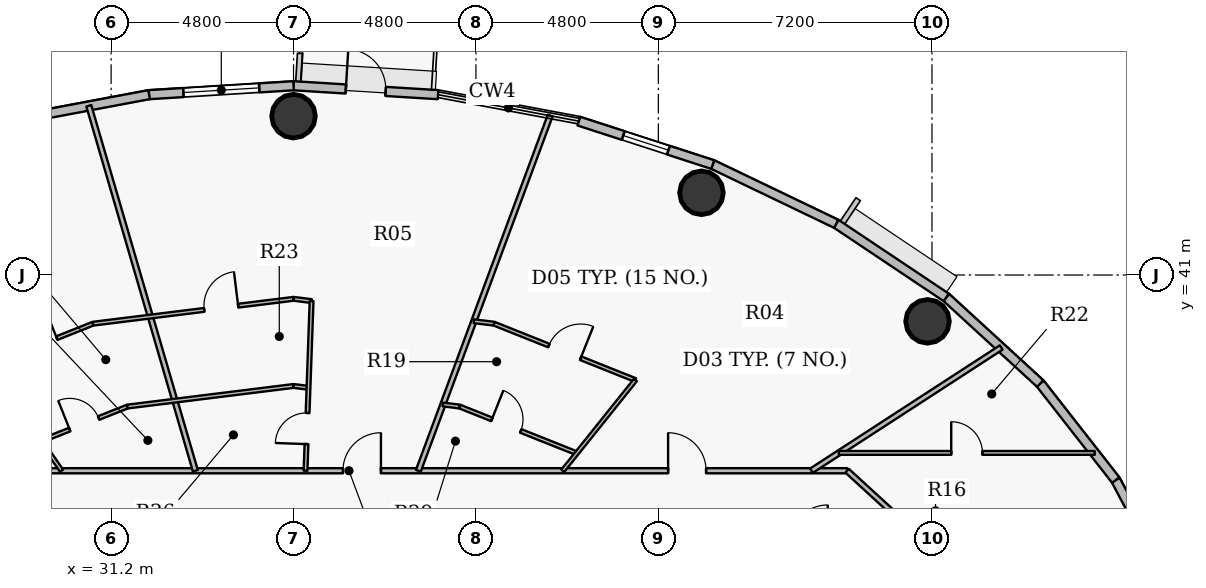
"""IFC4 building model, lengths in metres.
Left out: names, types, materials, properties, quantities, classifications, styles, units other than length and angle.
Written with IfcOpenShell. Run it as: python <this file> out.ifc"""

import sys

from ifc_helpers import new_model, si_unit, direction, frame, frame_2d, origin, origin_2d, place, context, subcontext, project, spatial, rectangle, hollow_circle, extrude, source, transform, mapped, element, fill, save


model = new_model("IFC4")
c1 = context("Model", 3, precision=1e-05, world=origin(), true_north=direction((0.0, 1.0)))
c2 = subcontext(c1, "Body", "Model", "MODEL_VIEW")
j1 = project(units=[si_unit("LENGTHUNIT", "METRE"), si_unit("PLANEANGLEUNIT", "RADIAN")], contexts=[c1])
p1 = place(None, origin())
s1 = spatial("IfcSite", under=j1, at=p1, CompositionType="ELEMENT")
p2 = place(p1, origin())
s2 = spatial("IfcBuilding", under=s1, at=p2, CompositionType="ELEMENT")
p3 = place(p2, frame((0.0, 0.0, 221.55)))
s3 = spatial("IfcBuildingStorey", under=s2, at=p3, CompositionType="ELEMENT", Elevation=221.55)
for number, where, z_axis, x_axis in (
    (1, (52.683, 39.781, 0.0), (0.0, 0.0, 1.0), (1.0, 0.0, 0.0)),
    (2, (46.735, 43.164, 0.0), (0.0, 0.0, 1.0), (1.0, 0.0, 0.0)),
    (3, (36.0, 45.18, 0.0), (0.0, 0.0, 1.0), (1.0, 0.0, 0.0)),
):
    element("IfcColumn", number, at=place(p3, frame(where, z_axis=z_axis, x_axis=x_axis)), inside=s3, PredefinedType="COLUMN", context=c2, shape_type="SweptSolid", body=[
        extrude(hollow_circle(Radius=0.575, WallThickness=0.036, at=origin_2d()), origin(), (0.0, 0.0, 1.0), 3.75),
    ])
p4 = place(p3, frame((57.636, 35.605, 0.0), z_axis=(0.0, 0.0, 1.0), x_axis=(0.46766049993, -0.883908172157, 0.0)))
e4 = element("IfcWall", 4, at=p4, inside=s3, PredefinedType="SOLIDWALL", context=c2, shape_type="SweptSolid", body=[
    extrude(rectangle(XDim=3.11, YDim=0.24, at=frame_2d((1.555, 0.0))), origin(), (0.0, 0.0, 1.0), 3.5),
])
p5 = place(p3, frame((55.648, 38.145, 0.0), z_axis=(0.0, 0.0, 1.0), x_axis=(0.616312344705, -0.787501805562, 0.0)))
e5 = element("IfcWall", 5, at=p5, inside=s3, PredefinedType="SOLIDWALL", context=c2, shape_type="SweptSolid", body=[
    extrude(rectangle(XDim=3.225, YDim=0.24, at=frame_2d((1.612, 0.0))), origin(), (0.0, 0.0, 1.0), 3.5),
])
p6 = place(p3, frame((53.176, 40.411, 0.0), z_axis=(0.0, 0.0, 1.0), x_axis=(0.737123922599, -0.675757591694, 0.0)))
e6 = element("IfcWall", 6, at=p6, inside=s3, PredefinedType="SOLIDWALL", context=c2, shape_type="SweptSolid", body=[
    extrude(rectangle(XDim=3.354, YDim=0.24, at=frame_2d((1.677, 0.0))), origin(), (0.0, 0.0, 1.0), 3.5),
])
p7 = place(p3, frame((50.28, 42.348, 0.0), z_axis=(0.0, 0.0, 1.0), x_axis=(0.831262496074, -0.555880079352, 0.0)))
e7 = element("IfcWall", 7, at=p7, inside=s3, PredefinedType="SOLIDWALL", context=c2, shape_type="SweptSolid", body=[
    extrude(rectangle(XDim=3.484, YDim=0.24, at=frame_2d((1.742, 0.0))), origin(), (0.0, 0.0, 1.0), 3.5),
])
p8 = place(p3, frame((47.031, 43.906, 0.0), z_axis=(0.0, 0.0, 1.0), x_axis=(0.901598104751, -0.432574684313, 0.0)))
e8 = element("IfcWall", 8, at=p8, inside=s3, PredefinedType="SOLIDWALL", context=c2, shape_type="SweptSolid", body=[
    extrude(rectangle(XDim=3.604, YDim=0.24, at=frame_2d((1.802, 0.0))), origin(), (0.0, 0.0, 1.0), 3.5),
])
p9 = place(p3, frame((43.509, 45.049, 0.0), z_axis=(0.0, 0.0, 1.0), x_axis=(0.951210789182, -0.308541787354, 0.0)))
e9 = element("IfcWall", 9, at=p9, inside=s3, PredefinedType="SOLIDWALL", context=c2, shape_type="SweptSolid", body=[
    extrude(rectangle(XDim=3.702, YDim=0.24, at=frame_2d((1.851, 0.0))), origin(), (0.0, 0.0, 1.0), 3.5),
])
p10 = place(p9, frame((1.226, 0.0, 0.9)))
e10 = element("IfcOpeningElement", 10, at=p10, cuts=e9, PredefinedType="OPENING", context=c2, shape_type="SweptSolid", body=[
    extrude(rectangle(XDim=1.25, YDim=1.65, at=origin_2d()), frame((0.625, 0.13, 0.825), z_axis=(0.0, -1.0, 0.0), x_axis=(1.0, 0.0, 0.0)), (0.0, 0.0, 1.0), 0.26),
])
p11 = place(p3, frame((36.0, 45.98, 0.0), z_axis=(0.0, 0.0, 1.0), x_axis=(0.998108785312, -0.06147237333, 0.0)))
e11 = element("IfcWall", 11, at=p11, inside=s3, PredefinedType="SOLIDWALL", context=c2, shape_type="SweptSolid", body=[
    extrude(rectangle(XDim=3.809, YDim=0.24, at=frame_2d((1.904, 0.0))), origin(), (0.0, 0.0, 1.0), 3.5),
])
p12 = place(p11, frame((1.379, 0.0, 0.0)))
e12 = element("IfcOpeningElement", 12, at=p12, cuts=e11, PredefinedType="OPENING", context=c2, shape_type="SweptSolid", body=[
    extrude(rectangle(XDim=1.05, YDim=2.15, at=origin_2d()), frame((0.525, 0.13, 1.075), z_axis=(0.0, -1.0, 0.0), x_axis=(1.0, 0.0, 0.0)), (0.0, 0.0, 1.0), 0.26),
])
p13 = place(p3, frame((32.198, 45.746, 0.0), z_axis=(0.0, 0.0, 1.0), x_axis=(0.998108785312, 0.06147237333, 0.0)))
e13 = element("IfcWall", 13, at=p13, inside=s3, PredefinedType="SOLIDWALL", context=c2, shape_type="SweptSolid", body=[
    extrude(rectangle(XDim=3.809, YDim=0.24, at=frame_2d((1.904, 0.0))), origin(), (0.0, 0.0, 1.0), 3.5),
])
p14 = place(p13, frame((0.905, 0.0, 0.9)))
e14 = element("IfcOpeningElement", 14, at=p14, cuts=e13, PredefinedType="OPENING", context=c2, shape_type="SweptSolid", body=[
    extrude(rectangle(XDim=2.0, YDim=1.75, at=origin_2d()), frame((1.0, 0.13, 0.875), z_axis=(0.0, -1.0, 0.0), x_axis=(1.0, 0.0, 0.0)), (0.0, 0.0, 1.0), 0.26),
])
p15 = place(p3, frame((28.491, 45.049, 0.0), z_axis=(0.0, 0.0, 1.0), x_axis=(0.982784898575, 0.184753465822, 0.0)))
e15 = element("IfcWall", 15, at=p15, inside=s3, PredefinedType="SOLIDWALL", context=c2, shape_type="SweptSolid", body=[
    extrude(rectangle(XDim=3.773, YDim=0.24, at=frame_2d((1.886, 0.0))), origin(), (0.0, 0.0, 1.0), 3.5),
])
p16 = place(p3, frame((24.35, 35.85, 0.0), z_axis=(0.0, 0.0, 1.0), x_axis=(1.0, 0.0, 0.0)))
e16 = element("IfcWall", 16, at=p16, inside=s3, PredefinedType="PARTITIONING", context=c2, shape_type="SweptSolid", body=[
    extrude(rectangle(XDim=26.218, YDim=0.135, at=frame_2d((13.109, 0.0))), origin(), (0.0, 0.0, 1.0), 2.935),
])
p17 = place(p16, frame((21.507, 0.0, 0.0)))
e17 = element("IfcOpeningElement", 17, at=p17, cuts=e16, PredefinedType="OPENING", context=c2, shape_type="SweptSolid", body=[
    extrude(rectangle(XDim=1.0, YDim=2.15, at=origin_2d()), frame((0.5, 0.078, 1.075), z_axis=(0.0, -1.0, 0.0), x_axis=(1.0, 0.0, 0.0)), (0.0, 0.0, 1.0), 0.155),
])
p18 = place(p16, frame((12.95, 0.0, 0.0)))
e18 = element("IfcOpeningElement", 18, at=p18, cuts=e16, PredefinedType="OPENING", context=c2, shape_type="SweptSolid", body=[
    extrude(rectangle(XDim=1.0, YDim=2.15, at=origin_2d()), frame((0.5, 0.078, 1.075), z_axis=(0.0, -1.0, 0.0), x_axis=(1.0, 0.0, 0.0)), (0.0, 0.0, 1.0), 0.155),
])
p19 = place(p16, frame((2.293, 0.0, 0.0)))
e19 = element("IfcOpeningElement", 19, at=p19, cuts=e16, PredefinedType="OPENING", context=c2, shape_type="SweptSolid", body=[
    extrude(rectangle(XDim=1.0, YDim=2.15, at=origin_2d()), frame((0.5, 0.078, 1.075), z_axis=(0.0, -1.0, 0.0), x_axis=(1.0, 0.0, 0.0)), (0.0, 0.0, 1.0), 0.155),
])
p20 = place(p3, frame((27.982, 38.626, 0.0), z_axis=(0.0, 0.0, 1.0), x_axis=(0.56776340906, -0.823191782838, 0.0)))
e20 = element("IfcWall", 20, at=p20, inside=s3, PredefinedType="PARTITIONING", context=c2, shape_type="SweptSolid", body=[
    extrude(rectangle(XDim=3.372, YDim=0.1, at=frame_2d((1.686, 0.0))), origin(), (0.0, 0.0, 1.0), 3.5),
])
p21 = place(p3, frame((27.982, 38.626, 0.0), z_axis=(0.0, 0.0, 1.0), x_axis=(0.928795965169, 0.370591493542, 0.0)))
e21 = element("IfcWall", 21, at=p21, inside=s3, PredefinedType="PARTITIONING", context=c2, shape_type="SweptSolid", body=[
    extrude(rectangle(XDim=2.95, YDim=0.1, at=frame_2d((1.475, 0.0))), origin(), (0.0, 0.0, 1.0), 2.935),
])
p22 = place(p21, frame((1.025, 0.0, 0.0)))
e22 = element("IfcOpeningElement", 22, at=p22, cuts=e21, PredefinedType="OPENING", context=c2, shape_type="SweptSolid", body=[
    extrude(rectangle(XDim=0.9, YDim=2.1, at=origin_2d()), frame((0.45, 0.06, 1.05), z_axis=(0.0, -1.0, 0.0), x_axis=(1.0, 0.0, 0.0)), (0.0, 0.0, 1.0), 0.12),
])
p23 = place(p3, frame((29.356, 36.633, 0.0), z_axis=(0.0, 0.0, 1.0), x_axis=(0.928806968298, 0.370563915731, 0.0)))
e23 = element("IfcWall", 23, at=p23, inside=s3, PredefinedType="PARTITIONING", context=c2, shape_type="SweptSolid", body=[
    extrude(rectangle(XDim=2.444, YDim=0.1, at=frame_2d((1.222, 0.0))), origin(), (0.0, 0.0, 1.0), 2.935),
])
p24 = place(p23, frame((0.812, 0.0, 0.0)))
e24 = element("IfcOpeningElement", 24, at=p24, cuts=e23, PredefinedType="OPENING", context=c2, shape_type="SweptSolid", body=[
    extrude(rectangle(XDim=0.82, YDim=2.1, at=origin_2d()), frame((0.41, 0.06, 1.05), z_axis=(0.0, -1.0, 0.0), x_axis=(1.0, 0.0, 0.0)), (0.0, 0.0, 1.0), 0.12),
])
p25 = place(p3, frame((30.613, 45.453, 0.0), z_axis=(0.0, 0.0, 1.0), x_axis=(0.280222100614, -0.959935192775, 0.0)))
e25 = element("IfcWall", 25, at=p25, inside=s3, PredefinedType="PARTITIONING", context=c2, shape_type="SweptSolid", body=[
    extrude(rectangle(XDim=10.004, YDim=0.135, at=frame_2d((5.002, 0.0))), origin(), (0.0, 0.0, 1.0), 2.985),
])
p26 = place(p3, frame((30.722, 39.719, 0.0), z_axis=(0.0, 0.0, 1.0), x_axis=(0.992398169186, 0.123068573551, 0.0)))
e26 = element("IfcWall", 26, at=p26, inside=s3, PredefinedType="PARTITIONING", context=c2, shape_type="SweptSolid", body=[
    extrude(rectangle(XDim=5.319, YDim=0.1, at=frame_2d((2.659, 0.0))), origin(), (0.0, 0.0, 1.0), 2.935),
])
p27 = place(p26, frame((2.95, 0.0, 0.0)))
e27 = element("IfcOpeningElement", 27, at=p27, cuts=e26, PredefinedType="OPENING", context=c2, shape_type="SweptSolid", body=[
    extrude(rectangle(XDim=0.9, YDim=2.1, at=origin_2d()), frame((0.45, 0.06, 1.05), z_axis=(0.0, -1.0, 0.0), x_axis=(1.0, 0.0, 0.0)), (0.0, 0.0, 1.0), 0.12),
])
p28 = place(p3, frame((31.627, 37.539, 0.0), z_axis=(0.0, 0.0, 1.0), x_axis=(0.992401810072, 0.123039210683, 0.0)))
e28 = element("IfcWall", 28, at=p28, inside=s3, PredefinedType="PARTITIONING", context=c2, shape_type="SweptSolid", body=[
    extrude(rectangle(XDim=4.407, YDim=0.1, at=frame_2d((2.204, 0.0))), origin(), (0.0, 0.0, 1.0), 2.935),
])
p29 = place(p3, frame((36.0, 38.081, 0.0), z_axis=(0.0, 0.0, 1.0), x_axis=(0.99240043869, -0.123050271381, 0.0)))
e29 = element("IfcWall", 29, at=p29, inside=s3, PredefinedType="PARTITIONING", context=c2, shape_type="SweptSolid", body=[
    extrude(rectangle(XDim=0.397, YDim=0.1, at=frame_2d((0.198, 0.0))), origin(), (0.0, 0.0, 1.0), 2.935),
])
p30 = place(p3, frame((36.0, 40.374, 0.0), z_axis=(0.0, 0.0, 1.0), x_axis=(0.992363891793, -0.123344664517, 0.0)))
e30 = element("IfcWall", 30, at=p30, inside=s3, PredefinedType="PARTITIONING", context=c2, shape_type="SweptSolid", body=[
    extrude(rectangle(XDim=0.479, YDim=0.1, at=frame_2d((0.24, 0.0))), origin(), (0.0, 0.0, 1.0), 2.935),
])
p31 = place(p3, frame((36.316, 35.85, 0.0), z_axis=(0.0, 0.0, 1.0), x_axis=(0.035687631784, 0.99936299358, 0.0)))
e31 = element("IfcWall", 31, at=p31, inside=s3, PredefinedType="PARTITIONING", context=c2, shape_type="SweptSolid", body=[
    extrude(rectangle(XDim=4.467, YDim=0.1, at=frame_2d((2.234, 0.0))), origin(), (0.0, 0.0, 1.0), 3.5),
])
p32 = place(p31, frame((0.702, 0.0, 0.0)))
e32 = element("IfcOpeningElement", 32, at=p32, cuts=e31, PredefinedType="OPENING", context=c2, shape_type="SweptSolid", body=[
    extrude(rectangle(XDim=0.82, YDim=2.1, at=origin_2d()), frame((0.41, 0.06, 1.05), z_axis=(0.0, -1.0, 0.0), x_axis=(1.0, 0.0, 0.0)), (0.0, 0.0, 1.0), 0.12),
])
p33 = place(p3, frame((39.285, 35.85, 0.0), z_axis=(0.0, 0.0, 1.0), x_axis=(0.347978689674, 0.937502443481, 0.0)))
e33 = element("IfcWall", 33, at=p33, inside=s3, PredefinedType="PARTITIONING", context=c2, shape_type="SweptSolid", body=[
    extrude(rectangle(XDim=9.969, YDim=0.135, at=frame_2d((4.984, 0.0))), origin(), (0.0, 0.0, 1.0), 2.985),
])
p34 = place(p3, frame((39.932, 37.593, 0.0), z_axis=(0.0, 0.0, 1.0), x_axis=(0.992412401992, -0.122953748919, 0.0)))
e34 = element("IfcWall", 34, at=p34, inside=s3, PredefinedType="PARTITIONING", context=c2, shape_type="SweptSolid", body=[
    extrude(rectangle(XDim=0.445, YDim=0.1, at=frame_2d((0.222, 0.0))), origin(), (0.0, 0.0, 1.0), 3.5),
])
p35 = place(p3, frame((40.373, 37.539, 0.0), z_axis=(0.0, 0.0, 1.0), x_axis=(0.928801257211, -0.370578230071, 0.0)))
e35 = element("IfcWall", 35, at=p35, inside=s3, PredefinedType="PARTITIONING", context=c2, shape_type="SweptSolid", body=[
    extrude(rectangle(XDim=3.316, YDim=0.1, at=frame_2d((1.658, 0.0))), origin(), (0.0, 0.0, 1.0), 2.935),
])
p36 = place(p35, frame((0.91, 0.0, 0.0)))
e36 = element("IfcOpeningElement", 36, at=p36, cuts=e35, PredefinedType="OPENING", context=c2, shape_type="SweptSolid", body=[
    extrude(rectangle(XDim=0.82, YDim=2.1, at=origin_2d()), frame((0.41, 0.06, 1.05), z_axis=(0.0, -1.0, 0.0), x_axis=(1.0, 0.0, 0.0)), (0.0, 0.0, 1.0), 0.12),
])
p37 = place(p3, frame((40.745, 39.785, 0.0), z_axis=(0.0, 0.0, 1.0), x_axis=(0.992431053699, -0.122803109303, 0.0)))
e37 = element("IfcWall", 37, at=p37, inside=s3, PredefinedType="PARTITIONING", context=c2, shape_type="SweptSolid", body=[
    extrude(rectangle(XDim=0.537, YDim=0.1, at=frame_2d((0.269, 0.0))), origin(), (0.0, 0.0, 1.0), 3.5),
])
p38 = place(p3, frame((41.278, 39.719, 0.0), z_axis=(0.0, 0.0, 1.0), x_axis=(0.928808650267, -0.3705596999, 0.0)))
e38 = element("IfcWall", 38, at=p38, inside=s3, PredefinedType="PARTITIONING", context=c2, shape_type="SweptSolid", body=[
    extrude(rectangle(XDim=4.002, YDim=0.1, at=frame_2d((2.001, 0.0))), origin(), (0.0, 0.0, 1.0), 2.935),
])
p39 = place(p38, frame((1.551, 0.0, 0.0)))
e39 = element("IfcOpeningElement", 39, at=p39, cuts=e38, PredefinedType="OPENING", context=c2, shape_type="SweptSolid", body=[
    extrude(rectangle(XDim=0.9, YDim=2.1, at=origin_2d()), frame((0.45, 0.06, 1.05), z_axis=(0.0, -1.0, 0.0), x_axis=(1.0, 0.0, 0.0)), (0.0, 0.0, 1.0), 0.12),
])
p40 = place(p3, frame((43.085, 35.85, 0.0), z_axis=(0.0, 0.0, 1.0), x_axis=(0.62500673738, 0.780619355531, 0.0)))
e40 = element("IfcWall", 40, at=p40, inside=s3, PredefinedType="PARTITIONING", context=c2, shape_type="SweptSolid", body=[
    extrude(rectangle(XDim=3.056, YDim=0.1, at=frame_2d((1.528, 0.0))), origin(), (0.0, 0.0, 1.0), 3.5),
])
p41 = place(p3, frame((49.628, 35.85, 0.0), z_axis=(0.0, 0.0, 1.0), x_axis=(0.838688976762, 0.544610686875, 0.0)))
e41 = element("IfcWall", 41, at=p41, inside=s3, PredefinedType="PARTITIONING", context=c2, shape_type="SweptSolid", body=[
    extrude(rectangle(XDim=5.954, YDim=0.135, at=frame_2d((2.977, 0.0))), origin(), (0.0, 0.0, 1.0), 2.985),
])
p42 = place(p3, frame((50.351, 36.319, 0.0), z_axis=(0.0, 0.0, 1.0), x_axis=(1.0, 0.0, 0.0)))
e42 = element("IfcWall", 42, at=p42, inside=s3, PredefinedType="PARTITIONING", context=c2, shape_type="SweptSolid", body=[
    extrude(rectangle(XDim=6.733, YDim=0.1, at=frame_2d((3.366, 0.0))), origin(), (0.0, 0.0, 1.0), 2.985),
])
p43 = place(p42, frame((2.956, 0.0, 0.0)))
e43 = element("IfcOpeningElement", 43, at=p43, cuts=e42, PredefinedType="OPENING", context=c2, shape_type="SweptSolid", body=[
    extrude(rectangle(XDim=0.82, YDim=2.1, at=origin_2d()), frame((0.41, 0.06, 1.05), z_axis=(0.0, -1.0, 0.0), x_axis=(1.0, 0.0, 0.0)), (0.0, 0.0, 1.0), 0.12),
])
p44 = place(p3, frame((50.568, 35.85, 0.0), z_axis=(0.0, 0.0, 1.0), x_axis=(0.737102657331, -0.675780787353, 0.0)))
e44 = element("IfcWall", 44, at=p44, inside=s3, PredefinedType="PARTITIONING", context=c2, shape_type="SweptSolid", body=[
    extrude(rectangle(XDim=1.772, YDim=0.135, at=frame_2d((0.886, 0.0))), origin(), (0.0, 0.0, 1.0), 3.5),
])
m1 = source(origin(), c2, "Body", "SweptSolid", [
    extrude(rectangle(XDim=1.05, YDim=2.15, at=origin_2d()), frame((0.525, 0.025, 1.075), z_axis=(0.0, -1.0, 0.0), x_axis=(1.0, 0.0, 0.0)), (0.0, 0.0, 1.0), 0.05),
])
p45 = place(p12, origin())
e45 = element("IfcDoor", 45, at=p45, inside=s3, OperationType="SINGLE_SWING_LEFT", PredefinedType="DOOR", context=c2, shape_type="MappedRepresentation", body=[
    mapped(m1, transform((0.0, 0.0, 0.0), x_axis=(1.0, 0.0, 0.0), y_axis=(0.0, 1.0, 0.0), z_axis=(0.0, 0.0, 1.0), scale=1.0)),
])
fill(e12, e45)
m2 = source(origin(), c2, "Body", "SweptSolid", [
    extrude(rectangle(XDim=2.0, YDim=1.75, at=origin_2d()), frame((1.0, 0.03, 0.875), z_axis=(0.0, -1.0, 0.0), x_axis=(1.0, 0.0, 0.0)), (0.0, 0.0, 1.0), 0.06),
])
p46 = place(p14, origin())
e46 = element("IfcWindow", 46, at=p46, inside=s3, PartitioningType="DOUBLE_PANEL_VERTICAL", PredefinedType="WINDOW", context=c2, shape_type="MappedRepresentation", body=[
    mapped(m2, transform((0.0, 0.0, 0.0), x_axis=(1.0, 0.0, 0.0), y_axis=(0.0, 1.0, 0.0), z_axis=(0.0, 0.0, 1.0), scale=1.0)),
])
fill(e14, e46)
m3 = source(origin(), c2, "Body", "SweptSolid", [
    extrude(rectangle(XDim=1.25, YDim=1.65, at=origin_2d()), frame((0.625, 0.03, 0.825), z_axis=(0.0, -1.0, 0.0), x_axis=(1.0, 0.0, 0.0)), (0.0, 0.0, 1.0), 0.06),
])
p47 = place(p10, origin())
e47 = element("IfcWindow", 47, at=p47, inside=s3, PartitioningType="SINGLE_PANEL", PredefinedType="WINDOW", context=c2, shape_type="MappedRepresentation", body=[
    mapped(m3, transform((0.0, 0.0, 0.0), x_axis=(1.0, 0.0, 0.0), y_axis=(0.0, 1.0, 0.0), z_axis=(0.0, 0.0, 1.0), scale=1.0)),
])
fill(e10, e47)
m4 = source(origin(), c2, "Body", "SweptSolid", [
    extrude(rectangle(XDim=1.0, YDim=2.15, at=origin_2d()), frame((0.5, 0.025, 1.075), z_axis=(0.0, -1.0, 0.0), x_axis=(1.0, 0.0, 0.0)), (0.0, 0.0, 1.0), 0.05),
])
p48 = place(p17, origin())
e48 = element("IfcDoor", 48, at=p48, inside=s3, OperationType="SINGLE_SWING_LEFT", PredefinedType="DOOR", context=c2, shape_type="MappedRepresentation", body=[
    mapped(m4, transform((0.0, 0.0, 0.0), x_axis=(1.0, 0.0, 0.0), y_axis=(0.0, 1.0, 0.0), z_axis=(0.0, 0.0, 1.0), scale=1.0)),
])
fill(e17, e48)
m5 = source(origin(), c2, "Body", "SweptSolid", [
    extrude(rectangle(XDim=0.9, YDim=2.1, at=origin_2d()), frame((0.45, 0.025, 1.05), z_axis=(0.0, -1.0, 0.0), x_axis=(1.0, 0.0, 0.0)), (0.0, 0.0, 1.0), 0.05),
])
p49 = place(p39, origin())
e49 = element("IfcDoor", 49, at=p49, inside=s3, OperationType="SINGLE_SWING_RIGHT", PredefinedType="DOOR", context=c2, shape_type="MappedRepresentation", body=[
    mapped(m5, transform((0.0, 0.0, 0.0), x_axis=(1.0, 0.0, 0.0), y_axis=(0.0, 1.0, 0.0), z_axis=(0.0, 0.0, 1.0), scale=1.0)),
])
fill(e39, e49)
m6 = source(origin(), c2, "Body", "SweptSolid", [
    extrude(rectangle(XDim=0.82, YDim=2.1, at=origin_2d()), frame((0.41, 0.025, 1.05), z_axis=(0.0, -1.0, 0.0), x_axis=(1.0, 0.0, 0.0)), (0.0, 0.0, 1.0), 0.05),
])
p50 = place(p36, origin())
e50 = element("IfcDoor", 50, at=p50, inside=s3, OperationType="SINGLE_SWING_LEFT", PredefinedType="DOOR", context=c2, shape_type="MappedRepresentation", body=[
    mapped(m6, transform((0.0, 0.0, 0.0), x_axis=(1.0, 0.0, 0.0), y_axis=(0.0, 1.0, 0.0), z_axis=(0.0, 0.0, 1.0), scale=1.0)),
])
fill(e36, e50)
p51 = place(p18, origin())
e51 = element("IfcDoor", 51, at=p51, inside=s3, OperationType="SINGLE_SWING_RIGHT", PredefinedType="DOOR", context=c2, shape_type="MappedRepresentation", body=[
    mapped(m4, transform((0.0, 0.0, 0.0), x_axis=(1.0, 0.0, 0.0), y_axis=(0.0, 1.0, 0.0), z_axis=(0.0, 0.0, 1.0), scale=1.0)),
])
fill(e18, e51)
p52 = place(p32, origin())
e52 = element("IfcDoor", 52, at=p52, inside=s3, OperationType="SINGLE_SWING_LEFT", PredefinedType="DOOR", context=c2, shape_type="MappedRepresentation", body=[
    mapped(m6, transform((0.0, 0.0, 0.0), x_axis=(1.0, 0.0, 0.0), y_axis=(0.0, 1.0, 0.0), z_axis=(0.0, 0.0, 1.0), scale=1.0)),
])
fill(e32, e52)
p53 = place(p27, origin())
e53 = element("IfcDoor", 53, at=p53, inside=s3, OperationType="SINGLE_SWING_RIGHT", PredefinedType="DOOR", context=c2, shape_type="MappedRepresentation", body=[
    mapped(m5, transform((0.0, 0.0, 0.0), x_axis=(1.0, 0.0, 0.0), y_axis=(0.0, 1.0, 0.0), z_axis=(0.0, 0.0, 1.0), scale=1.0)),
])
fill(e27, e53)
p54 = place(p22, origin())
e54 = element("IfcDoor", 54, at=p54, inside=s3, OperationType="SINGLE_SWING_RIGHT", PredefinedType="DOOR", context=c2, shape_type="MappedRepresentation", body=[
    mapped(m5, transform((0.0, 0.0, 0.0), x_axis=(1.0, 0.0, 0.0), y_axis=(0.0, 1.0, 0.0), z_axis=(0.0, 0.0, 1.0), scale=1.0)),
])
fill(e22, e54)
p55 = place(p24, origin())
e55 = element("IfcDoor", 55, at=p55, inside=s3, OperationType="SINGLE_SWING_LEFT", PredefinedType="DOOR", context=c2, shape_type="MappedRepresentation", body=[
    mapped(m6, transform((0.0, 0.0, 0.0), x_axis=(1.0, 0.0, 0.0), y_axis=(0.0, 1.0, 0.0), z_axis=(0.0, 0.0, 1.0), scale=1.0)),
])
fill(e24, e55)
p56 = place(p43, origin())
e56 = element("IfcDoor", 56, at=p56, inside=s3, OperationType="SINGLE_SWING_LEFT", PredefinedType="DOOR", context=c2, shape_type="MappedRepresentation", body=[
    mapped(m6, transform((0.0, 0.0, 0.0), x_axis=(1.0, 0.0, 0.0), y_axis=(0.0, 1.0, 0.0), z_axis=(0.0, 0.0, 1.0), scale=1.0)),
])
fill(e43, e56)
save(model, sys.argv[1])
